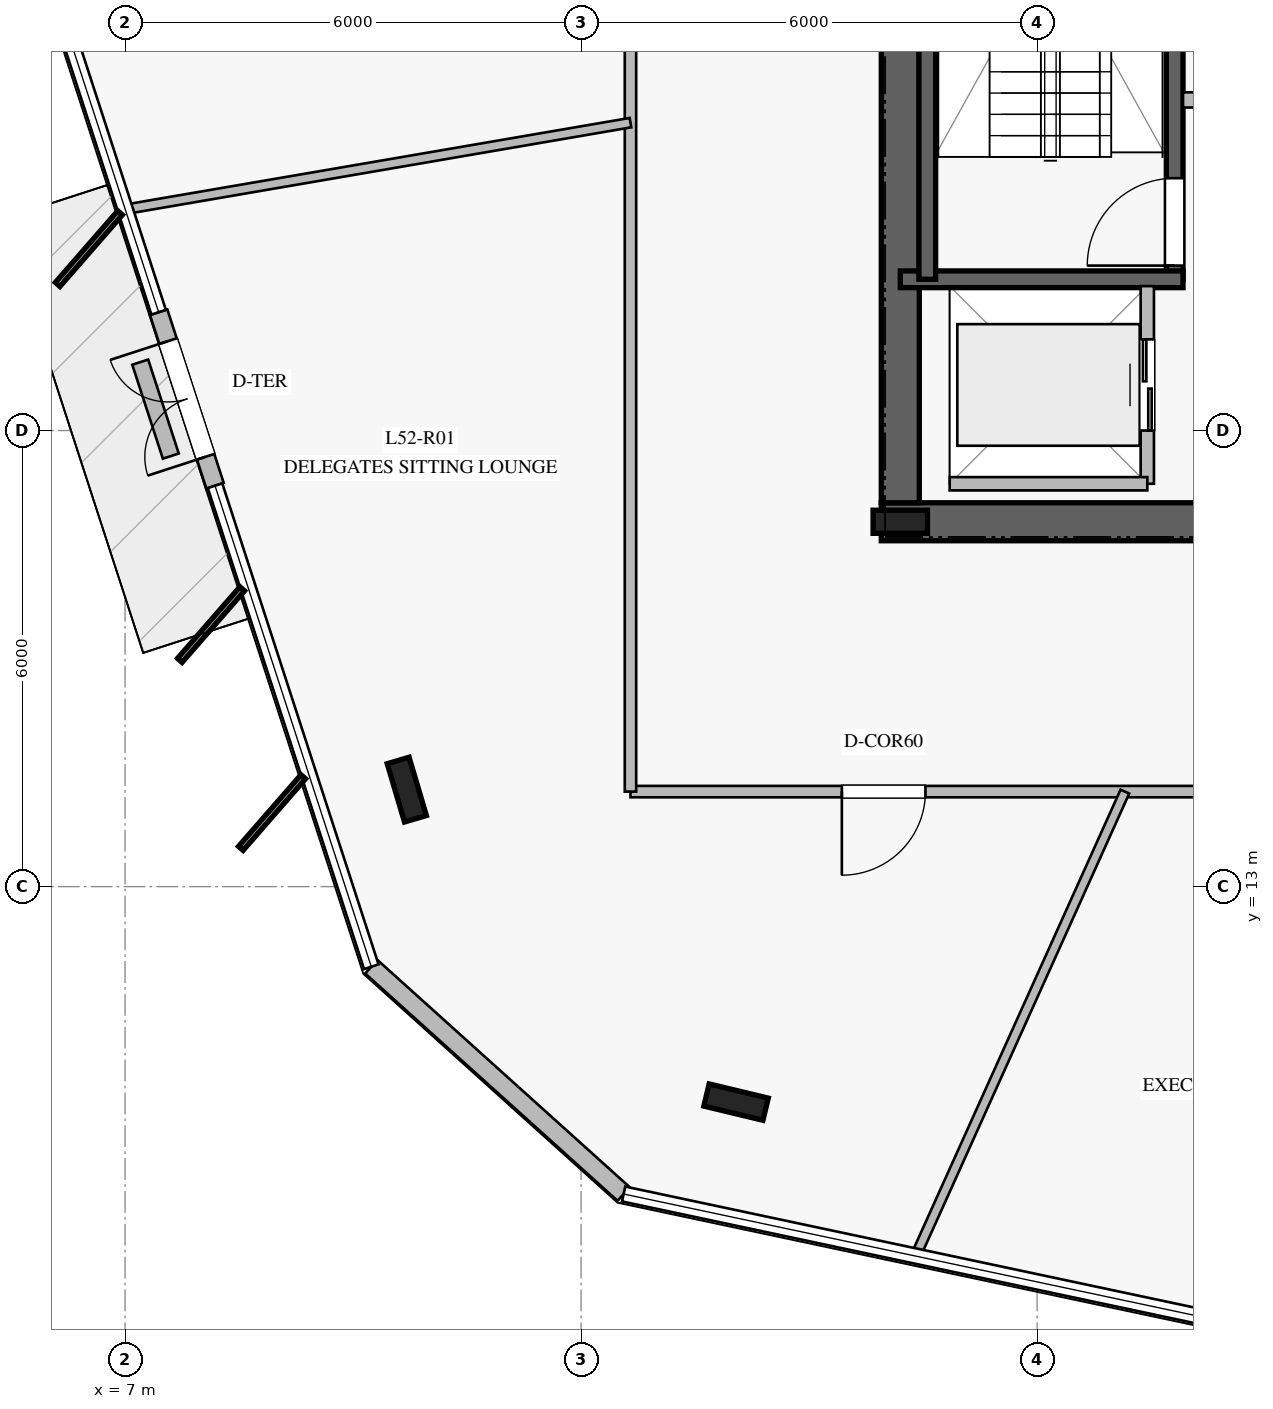
"""IFC4 building model, lengths in metres.
Left out: names, types, materials, properties, quantities, classifications, styles, units other than length and angle.
Written with IfcOpenShell. Run it as: python <this file> out.ifc"""

import sys

from ifc_helpers import new_model, si_unit, direction, frame, frame_2d, origin, origin_2d, place, context, subcontext, project, spatial, rectangle, i_section, extrude, element, fill, save


model = new_model("IFC4")
c1 = context("Model", 3, precision=1e-05, world=origin(), true_north=direction((0.0, 1.0)))
c2 = subcontext(c1, "Body", "Model", "MODEL_VIEW")
j1 = project(units=[si_unit("LENGTHUNIT", "METRE"), si_unit("PLANEANGLEUNIT", "RADIAN")], contexts=[c1])
p1 = place(None, origin())
s1 = spatial("IfcSite", under=j1, at=p1, CompositionType="ELEMENT")
p2 = place(p1, origin())
s2 = spatial("IfcBuilding", under=s1, at=p2, CompositionType="ELEMENT")
p3 = place(p2, frame((0.0, 0.0, 216.8)))
s3 = spatial("IfcBuildingStorey", under=s2, at=p3, CompositionType="ELEMENT", Elevation=216.8)
p4 = place(p3, frame((16.95, 17.8, 0.0), z_axis=(0.0, 0.0, 1.0), x_axis=(1.0, 0.0, 0.0)))
e1 = element("IfcWall", 1, at=p4, inside=s3, PredefinedType="SHEAR", context=c2, shape_type="SweptSolid", body=[
    extrude(rectangle(XDim=16.1, YDim=0.5, at=frame_2d((8.05, 0.0))), origin(), (0.0, 0.0, 1.0), 3.78),
])
p5 = place(p4, frame((5.0, 0.0, 0.0)))
e2 = element("IfcOpeningElement", 2, at=p5, cuts=e1, PredefinedType="OPENING", context=c2, shape_type="SweptSolid", body=[
    extrude(rectangle(XDim=1.2, YDim=2.25, at=frame_2d((0.6, 1.125))), frame((0.0, 0.26, 0.0), z_axis=(0.0, -1.0, 0.0), x_axis=(1.0, 0.0, 0.0)), (0.0, 0.0, 1.0), 0.52),
])
p6 = place(p4, frame((10.9, 0.0, 0.0)))
e3 = element("IfcOpeningElement", 3, at=p6, cuts=e1, PredefinedType="OPENING", context=c2, shape_type="SweptSolid", body=[
    extrude(rectangle(XDim=1.1, YDim=2.2, at=frame_2d((0.55, 1.1))), frame((0.0, 0.26, 0.0), z_axis=(0.0, -1.0, 0.0), x_axis=(1.0, 0.0, 0.0)), (0.0, 0.0, 1.0), 0.52),
])
p7 = place(p3, frame((17.2, 31.95, 0.0), z_axis=(0.0, 0.0, 1.0), x_axis=(0.0, -1.0, 0.0)))
e4 = element("IfcWall", 4, at=p7, inside=s3, PredefinedType="SHEAR", context=c2, shape_type="SweptSolid", body=[
    extrude(rectangle(XDim=13.9, YDim=0.5, at=frame_2d((6.95, 0.0))), origin(), (0.0, 0.0, 1.0), 3.78),
])
p8 = place(p7, frame((2.1, 0.0, 0.0)))
e5 = element("IfcOpeningElement", 5, at=p8, cuts=e4, PredefinedType="OPENING", context=c2, shape_type="SweptSolid", body=[
    extrude(rectangle(XDim=1.5, YDim=2.2, at=frame_2d((0.75, 1.1))), frame((0.0, 0.26, 0.0), z_axis=(0.0, -1.0, 0.0), x_axis=(1.0, 0.0, 0.0)), (0.0, 0.0, 1.0), 0.52),
])
p9 = place(p3, frame((17.2, 17.8, 0.0), z_axis=(0.0, 0.0, 1.0), x_axis=(1.0, 0.0, 0.0)))
e6 = element("IfcColumn", 6, at=p9, inside=s3, PredefinedType="COLUMN", context=c2, shape_type="SweptSolid", body=[
    extrude(i_section(OverallWidth=0.304, OverallDepth=0.716, WebThickness=0.021, FlangeThickness=0.04, at=origin_2d()), origin(), (0.0, 0.0, 1.0), 4.0),
])
p10 = place(p3, frame((20.81, 20.99, 0.0), z_axis=(0.0, 0.0, 1.0), x_axis=(0.0, 1.0, 0.0)))
e7 = element("IfcWall", 7, at=p10, inside=s3, PredefinedType="SOLIDWALL", context=c2, shape_type="SweptSolid", body=[
    extrude(rectangle(XDim=7.22, YDim=0.22, at=frame_2d((3.61, 0.0))), origin(), (0.0, 0.0, 1.0), 3.78),
])
p11 = place(p10, frame((0.18, 0.0, 0.0)))
e8 = element("IfcOpeningElement", 8, at=p11, cuts=e7, PredefinedType="OPENING", context=c2, shape_type="SweptSolid", body=[
    extrude(rectangle(XDim=1.15, YDim=2.2, at=frame_2d((0.575, 1.1))), frame((0.0, 0.12, 0.0), z_axis=(0.0, -1.0, 0.0), x_axis=(1.0, 0.0, 0.0)), (0.0, 0.0, 1.0), 0.24),
])
p12 = place(p3, frame((17.2, 20.99, 0.0), z_axis=(0.0, 0.0, 1.0), x_axis=(1.0, 0.0, 0.0)))
e9 = element("IfcWall", 9, at=p12, inside=s3, PredefinedType="SOLIDWALL", context=c2, shape_type="SweptSolid", body=[
    extrude(rectangle(XDim=3.72, YDim=0.22, at=frame_2d((1.86, 0.0))), origin(), (0.0, 0.0, 1.0), 3.78),
])
p13 = place(p3, frame((17.555, 28.21, 0.0), z_axis=(0.0, 0.0, 1.0), x_axis=(0.0, -1.0, 0.0)))
e10 = element("IfcWall", 10, at=p13, inside=s3, PredefinedType="SOLIDWALL", context=c2, shape_type="SweptSolid", body=[
    extrude(rectangle(XDim=7.22, YDim=0.22, at=frame_2d((3.61, 0.0))), origin(), (0.0, 0.0, 1.0), 3.78),
])
for number, where, z_axis, x_axis in (
    (11, (10.707, 14.276, 0.0), (0.0, 0.0, 1.0), (-0.284, 0.959, 0.0)),
    (12, (15.039, 10.165, 0.0), (0.0, 0.0, 1.0), (-0.972, 0.233, 0.0)),
):
    element("IfcColumn", number, at=place(p3, frame(where, z_axis=z_axis, x_axis=x_axis)), inside=s3, PredefinedType="COLUMN", context=c2, shape_type="SweptSolid", body=[
        extrude(i_section(OverallWidth=0.3, OverallDepth=0.8, WebThickness=0.018, FlangeThickness=0.033, at=origin_2d()), origin(), (0.0, 0.0, 1.0), 4.0),
    ])
p14 = place(p3, frame((7.442, 20.557, 0.0), z_axis=(0.0, 0.0, 1.0), x_axis=(0.309171157328, -0.951006411901, 0.0)))
e13 = element("IfcWall", 13, at=p14, inside=s3, PredefinedType="STANDARD", context=c2, shape_type="SweptSolid", body=[
    extrude(rectangle(XDim=2.401, YDim=0.24, at=frame_2d((1.2, 0.0))), origin(), (0.0, 0.0, 1.0), 3.78),
])
p15 = place(p14, frame((0.4, 0.0, 0.0)))
e14 = element("IfcOpeningElement", 14, at=p15, cuts=e13, PredefinedType="OPENING", context=c2, shape_type="SweptSolid", body=[
    extrude(rectangle(XDim=1.6, YDim=2.25, at=frame_2d((0.8, 1.125))), frame((0.0, 0.13, 0.0), z_axis=(0.0, -1.0, 0.0), x_axis=(1.0, 0.0, 0.0)), (0.0, 0.0, 1.0), 0.26),
])
p16 = place(p3, frame((10.24, 11.946, 0.0), z_axis=(0.0, 0.0, 1.0), x_axis=(0.74307946371, -0.669203190827, 0.0)))
e15 = element("IfcWall", 15, at=p16, inside=s3, PredefinedType="STANDARD", context=c2, shape_type="SweptSolid", body=[
    extrude(rectangle(XDim=4.468, YDim=0.24, at=frame_2d((2.234, 0.0))), origin(), (0.0, 0.0, 1.0), 3.78),
])
p17 = place(p3, frame((7.2, 19.9, 0.0), z_axis=(0.0, 0.0, 1.0), x_axis=(0.309400389293, -0.950931858287, 0.0)))
e16 = element("IfcWall", 16, at=p17, inside=s3, PredefinedType="USERDEFINED", context=c2, shape_type="SweptSolid", body=[
    extrude(rectangle(XDim=1.3, YDim=0.22, at=frame_2d((0.65, 0.0))), origin(), (0.0, 0.0, 1.0), 0.4),
])
p18 = place(p3, frame((20.92, 23.35, 0.0), z_axis=(0.0, 0.0, 1.0), x_axis=(1.0, 0.0, 0.0)))
e17 = element("IfcWall", 17, at=p18, inside=s3, PredefinedType="PARTITIONING", context=c2, shape_type="SweptSolid", body=[
    extrude(rectangle(XDim=3.38, YDim=0.2, at=frame_2d((1.69, 0.0))), origin(), (0.0, 0.0, 1.0), 3.78),
])
p19 = place(p3, frame((20.45, 18.3, 0.0), z_axis=(0.0, 0.0, 1.0), x_axis=(0.0, 1.0, 0.0)))
e18 = element("IfcWall", 18, at=p19, inside=s3, PredefinedType="PARTITIONING", context=c2, shape_type="SweptSolid", body=[
    extrude(rectangle(XDim=2.6, YDim=0.175, at=frame_2d((1.3, 0.0))), origin(), (0.0, 0.0, 1.0), 3.78),
])
p20 = place(p19, frame((0.7, 0.0, 0.0)))
e19 = element("IfcOpeningElement", 19, at=p20, cuts=e18, PredefinedType="OPENING", context=c2, shape_type="SweptSolid", body=[
    extrude(rectangle(XDim=1.2, YDim=2.2, at=frame_2d((0.6, 1.1))), frame((0.0, 0.098, 0.0), z_axis=(0.0, -1.0, 0.0), x_axis=(1.0, 0.0, 0.0)), (0.0, 0.0, 1.0), 0.195),
])
p21 = place(p3, frame((17.85, 18.3, 0.0), z_axis=(0.0, 0.0, 1.0), x_axis=(1.0, 0.0, 0.0)))
e20 = element("IfcWall", 20, at=p21, inside=s3, PredefinedType="PARTITIONING", context=c2, shape_type="SweptSolid", body=[
    extrude(rectangle(XDim=2.6, YDim=0.175, at=frame_2d((1.3, 0.0))), origin(), (0.0, 0.0, 1.0), 3.78),
])
p22 = place(p3, frame((36.35, 14.25, 0.0), z_axis=(0.0, 0.0, 1.0), x_axis=(-1.0, 0.0, 0.0)))
e21 = element("IfcWall", 21, at=p22, inside=s3, PredefinedType="PARTITIONING", context=c2, shape_type="SweptSolid", body=[
    extrude(rectangle(XDim=22.7, YDim=0.15, at=frame_2d((11.35, 0.0))), origin(), (0.0, 0.0, 1.0), 3.05),
])
p23 = place(p22, frame((18.819, 0.0, 0.0)))
e22 = element("IfcOpeningElement", 22, at=p23, cuts=e21, PredefinedType="OPENING", context=c2, shape_type="SweptSolid", body=[
    extrude(rectangle(XDim=1.1, YDim=2.2, at=frame_2d((0.55, 1.1))), frame((0.0, 0.085, 0.0), z_axis=(0.0, -1.0, 0.0), x_axis=(1.0, 0.0, 0.0)), (0.0, 0.0, 1.0), 0.17),
])
p24 = place(p22, frame((10.682, 0.0, 0.0)))
e23 = element("IfcOpeningElement", 23, at=p24, cuts=e21, PredefinedType="OPENING", context=c2, shape_type="SweptSolid", body=[
    extrude(rectangle(XDim=1.1, YDim=2.2, at=frame_2d((0.55, 1.1))), frame((0.0, 0.085, 0.0), z_axis=(0.0, -1.0, 0.0), x_axis=(1.0, 0.0, 0.0)), (0.0, 0.0, 1.0), 0.17),
])
p25 = place(p3, frame((13.65, 14.25, 0.0), z_axis=(0.0, 0.0, 1.0), x_axis=(0.0, 1.0, 0.0)))
e24 = element("IfcWall", 24, at=p25, inside=s3, PredefinedType="PARTITIONING", context=c2, shape_type="SweptSolid", body=[
    extrude(rectangle(XDim=21.5, YDim=0.15, at=frame_2d((10.75, 0.0))), origin(), (0.0, 0.0, 1.0), 3.28),
])
p26 = place(p25, frame((14.282, 0.0, 0.0)))
e25 = element("IfcOpeningElement", 25, at=p26, cuts=e24, PredefinedType="OPENING", context=c2, shape_type="SweptSolid", body=[
    extrude(rectangle(XDim=1.1, YDim=2.2, at=frame_2d((0.55, 1.1))), frame((0.0, 0.085, 0.0), z_axis=(0.0, -1.0, 0.0), x_axis=(1.0, 0.0, 0.0)), (0.0, 0.0, 1.0), 0.17),
])
p27 = place(p3, frame((13.65, 23.051, 0.0), z_axis=(0.0, 0.0, 1.0), x_axis=(-0.985592022729, -0.169140074298, 0.0)))
e26 = element("IfcWall", 26, at=p27, inside=s3, PredefinedType="PARTITIONING", context=c2, shape_type="SweptSolid", body=[
    extrude(rectangle(XDim=6.728, YDim=0.125, at=frame_2d((3.364, 0.0))), origin(), (0.0, 0.0, 1.0), 3.18),
])
p28 = place(p3, frame((20.155, 14.25, 0.0), z_axis=(0.0, 0.0, 1.0), x_axis=(-0.410903648805, -0.911678776433, 0.0)))
e27 = element("IfcWall", 27, at=p28, inside=s3, PredefinedType="PARTITIONING", context=c2, shape_type="SweptSolid", body=[
    extrude(rectangle(XDim=6.686, YDim=0.125, at=frame_2d((3.343, 0.0))), origin(), (0.0, 0.0, 1.0), 3.05),
])
p29 = place(p15, frame((1.6, 0.0, 0.0), z_axis=(0.0, 0.0, 1.0), x_axis=(-1.0, 0.0, 0.0)))
e28 = element("IfcDoor", 28, at=p29, inside=s3, OperationType="DOUBLE_DOOR_SINGLE_SWING", PredefinedType="DOOR", context=c2, shape_type="SweptSolid", body=[
    extrude(rectangle(XDim=1.6, YDim=2.25, at=frame_2d((0.8, 1.125))), frame((0.0, 0.025, 0.0), z_axis=(0.0, -1.0, 0.0), x_axis=(1.0, 0.0, 0.0)), (0.0, 0.0, 1.0), 0.05),
])
fill(e14, e28)
p30 = place(p11, origin())
e29 = element("IfcDoor", 29, at=p30, inside=s3, OperationType="SINGLE_SWING_LEFT", PredefinedType="DOOR", context=c2, shape_type="SweptSolid", body=[
    extrude(rectangle(XDim=1.15, YDim=2.2, at=frame_2d((0.575, 1.1))), frame((0.0, 0.025, 0.0), z_axis=(0.0, -1.0, 0.0), x_axis=(1.0, 0.0, 0.0)), (0.0, 0.0, 1.0), 0.05),
])
fill(e8, e29)
p31 = place(p20, origin())
e30 = element("IfcDoor", 30, at=p31, inside=s3, OperationType="DOUBLE_DOOR_SLIDING", PredefinedType="DOOR", context=c2, shape_type="SweptSolid", body=[
    extrude(rectangle(XDim=1.2, YDim=2.2, at=frame_2d((0.6, 1.1))), frame((0.0, 0.025, 0.0), z_axis=(0.0, -1.0, 0.0), x_axis=(1.0, 0.0, 0.0)), (0.0, 0.0, 1.0), 0.05),
])
fill(e19, e30)
p32 = place(p23, origin())
e31 = element("IfcDoor", 31, at=p32, inside=s3, OperationType="SINGLE_SWING_RIGHT", PredefinedType="DOOR", context=c2, shape_type="SweptSolid", body=[
    extrude(rectangle(XDim=1.1, YDim=2.2, at=frame_2d((0.55, 1.1))), frame((0.0, 0.025, 0.0), z_axis=(0.0, -1.0, 0.0), x_axis=(1.0, 0.0, 0.0)), (0.0, 0.0, 1.0), 0.05),
])
fill(e22, e31)
save(model, sys.argv[1])
